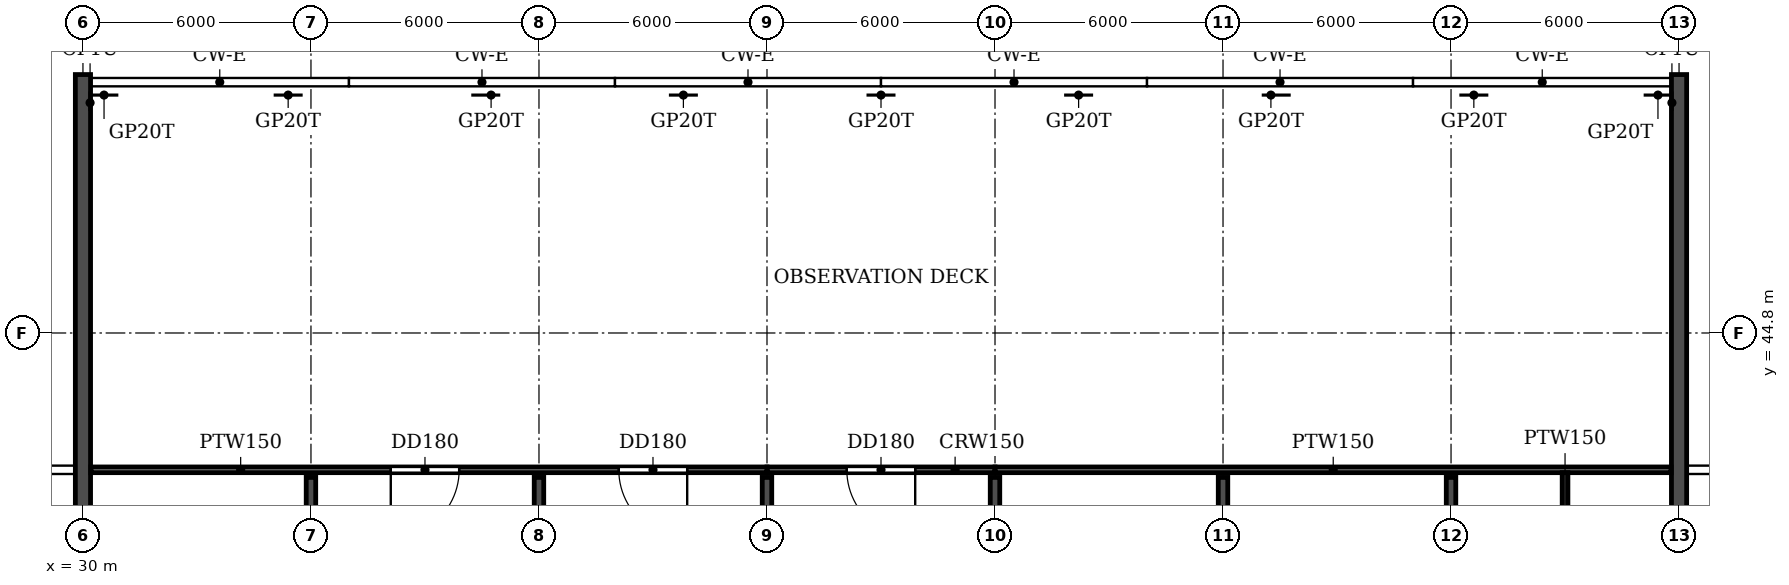
"""IFC4 building model, lengths in metres.
Left out: names, types, materials, properties, quantities, classifications, styles, units other than length and angle.
Written with IfcOpenShell. Run it as: python <this file> out.ifc"""

import sys

from ifc_helpers import new_model, si_unit, direction, frame, frame_2d, origin, place, context, subcontext, project, spatial, rectangle, extrude, element, fill, save


model = new_model("IFC4")
c1 = context("Model", 3, precision=1e-05, world=origin(), true_north=direction((0.0, 1.0)))
c2 = subcontext(c1, "Body", "Model", "MODEL_VIEW")
j1 = project(units=[si_unit("LENGTHUNIT", "METRE"), si_unit("PLANEANGLEUNIT", "RADIAN")], contexts=[c1])
p1 = place(None, origin())
s1 = spatial("IfcSite", under=j1, at=p1, CompositionType="ELEMENT")
p2 = place(p1, origin())
s2 = spatial("IfcBuilding", under=s1, at=p2, CompositionType="ELEMENT")
p3 = place(p2, frame((0.0, 0.0, 261.0)))
s3 = spatial("IfcBuildingStorey", under=s2, at=p3, CompositionType="ELEMENT", Elevation=261.0)
for number, where, z_axis, x_axis in (
    (1, (36.0, 30.5, 0.0), (0.0, 0.0, 1.0), (0.0, 1.0, 0.0)),
    (2, (42.0, 30.5, 0.0), (0.0, 0.0, 1.0), (0.0, 1.0, 0.0)),
    (3, (48.0, 30.5, 0.0), (0.0, 0.0, 1.0), (0.0, 1.0, 0.0)),
    (4, (54.0, 30.5, 0.0), (0.0, 0.0, 1.0), (0.0, 1.0, 0.0)),
    (5, (60.0, 30.5, 0.0), (0.0, 0.0, 1.0), (0.0, 1.0, 0.0)),
    (6, (66.0, 30.5, 0.0), (0.0, 0.0, 1.0), (0.0, 1.0, 0.0)),
):
    element("IfcWall", number, at=place(p3, frame(where, z_axis=z_axis, x_axis=x_axis)), inside=s3, PredefinedType="SHEAR", context=c2, shape_type="SweptSolid", body=[
        extrude(rectangle(XDim=10.5, YDim=0.25, at=frame_2d((5.25, 0.0))), origin(), (0.0, 0.0, 1.0), 5.7),
    ])
for number, where, z_axis, x_axis in (
    (7, (30.0, 30.5, -1.2), (0.0, 0.0, 1.0), (0.0, 1.0, 0.0)),
    (8, (72.0, 30.5, -1.2), (0.0, 0.0, 1.0), (0.0, 1.0, 0.0)),
):
    element("IfcWall", number, at=place(p3, frame(where, z_axis=z_axis, x_axis=x_axis)), inside=s3, PredefinedType="SHEAR", context=c2, shape_type="SweptSolid", body=[
        extrude(rectangle(XDim=21.1, YDim=0.4, at=frame_2d((10.55, 0.0))), origin(), (0.0, 0.0, 1.0), 6.9),
    ])
p4 = place(p3, frame((48.0, 41.2, 0.0), z_axis=(0.0, 0.0, 1.0), x_axis=(1.0, 0.0, 0.0)))
e9 = element("IfcWall", 9, at=p4, inside=s3, PredefinedType="PARTITIONING", context=c2, shape_type="SweptSolid", body=[
    extrude(rectangle(XDim=6.0, YDim=0.15, at=frame_2d((3.0, 0.0))), origin(), (0.0, 0.0, 1.0), 5.7),
])
p5 = place(p4, frame((2.1, 0.0, 0.0)))
e10 = element("IfcOpeningElement", 10, at=p5, cuts=e9, PredefinedType="OPENING", context=c2, shape_type="SweptSolid", body=[
    extrude(rectangle(XDim=1.8, YDim=2.1, at=frame_2d((0.9, 1.05))), frame((0.0, 0.085, 0.0), z_axis=(0.0, -1.0, 0.0), x_axis=(1.0, 0.0, 0.0)), (0.0, 0.0, 1.0), 0.17),
])
p6 = place(p3, frame((30.21, 41.2, 0.0), z_axis=(0.0, 0.0, 1.0), x_axis=(1.0, 0.0, 0.0)))
e11 = element("IfcWall", 11, at=p6, inside=s3, PredefinedType="PARTITIONING", context=c2, shape_type="SweptSolid", body=[
    extrude(rectangle(XDim=17.79, YDim=0.15, at=frame_2d((8.895, 0.0))), origin(), (0.0, 0.0, 1.0), 5.7),
])
p7 = place(p6, frame((7.89, 0.0, 0.0)))
e12 = element("IfcOpeningElement", 12, at=p7, cuts=e11, PredefinedType="OPENING", context=c2, shape_type="SweptSolid", body=[
    extrude(rectangle(XDim=1.8, YDim=2.1, at=frame_2d((0.9, 1.05))), frame((0.0, 0.085, 0.0), z_axis=(0.0, -1.0, 0.0), x_axis=(1.0, 0.0, 0.0)), (0.0, 0.0, 1.0), 0.17),
])
p8 = place(p6, frame((13.89, 0.0, 0.0)))
e13 = element("IfcOpeningElement", 13, at=p8, cuts=e11, PredefinedType="OPENING", context=c2, shape_type="SweptSolid", body=[
    extrude(rectangle(XDim=1.8, YDim=2.1, at=frame_2d((0.9, 1.05))), frame((0.0, 0.085, 0.0), z_axis=(0.0, -1.0, 0.0), x_axis=(1.0, 0.0, 0.0)), (0.0, 0.0, 1.0), 0.17),
])
p9 = place(p3, frame((54.0, 41.2, 0.0), z_axis=(0.0, 0.0, 1.0), x_axis=(1.0, 0.0, 0.0)))
e14 = element("IfcWall", 14, at=p9, inside=s3, PredefinedType="PARTITIONING", context=c2, shape_type="SweptSolid", body=[
    extrude(rectangle(XDim=17.79, YDim=0.15, at=frame_2d((8.895, 0.0))), origin(), (0.0, 0.0, 1.0), 5.7),
])
p10 = place(p3, frame((69.0, 32.875, 0.0), z_axis=(0.0, 0.0, 1.0), x_axis=(0.0, 1.0, 0.0)))
e15 = element("IfcWall", 15, at=p10, inside=s3, PredefinedType="PARTITIONING", context=c2, shape_type="SweptSolid", body=[
    extrude(rectangle(XDim=8.25, YDim=0.15, at=frame_2d((4.125, 0.0))), origin(), (0.0, 0.0, 1.0), 5.7),
])
p11 = place(p7, frame((1.8, 0.0, 0.0), z_axis=(0.0, 0.0, 1.0), x_axis=(-1.0, 0.0, 0.0)))
e16 = element("IfcDoor", 16, at=p11, inside=s3, OperationType="DOUBLE_DOOR_SINGLE_SWING", PredefinedType="DOOR", context=c2, shape_type="SweptSolid", body=[
    extrude(rectangle(XDim=1.8, YDim=2.1, at=frame_2d((0.9, 1.05))), frame((0.0, 0.025, 0.0), z_axis=(0.0, -1.0, 0.0), x_axis=(1.0, 0.0, 0.0)), (0.0, 0.0, 1.0), 0.05),
])
fill(e12, e16)
p12 = place(p8, frame((1.8, 0.0, 0.0), z_axis=(0.0, 0.0, 1.0), x_axis=(-1.0, 0.0, 0.0)))
e17 = element("IfcDoor", 17, at=p12, inside=s3, OperationType="DOUBLE_DOOR_SINGLE_SWING", PredefinedType="DOOR", context=c2, shape_type="SweptSolid", body=[
    extrude(rectangle(XDim=1.8, YDim=2.1, at=frame_2d((0.9, 1.05))), frame((0.0, 0.025, 0.0), z_axis=(0.0, -1.0, 0.0), x_axis=(1.0, 0.0, 0.0)), (0.0, 0.0, 1.0), 0.05),
])
fill(e13, e17)
p13 = place(p5, frame((1.8, 0.0, 0.0), z_axis=(0.0, 0.0, 1.0), x_axis=(-1.0, 0.0, 0.0)))
e18 = element("IfcDoor", 18, at=p13, inside=s3, OperationType="DOUBLE_DOOR_SINGLE_SWING", PredefinedType="DOOR", context=c2, shape_type="SweptSolid", body=[
    extrude(rectangle(XDim=1.8, YDim=2.1, at=frame_2d((0.9, 1.05))), frame((0.0, 0.025, 0.0), z_axis=(0.0, -1.0, 0.0), x_axis=(1.0, 0.0, 0.0)), (0.0, 0.0, 1.0), 0.05),
])
fill(e10, e18)
save(model, sys.argv[1])
